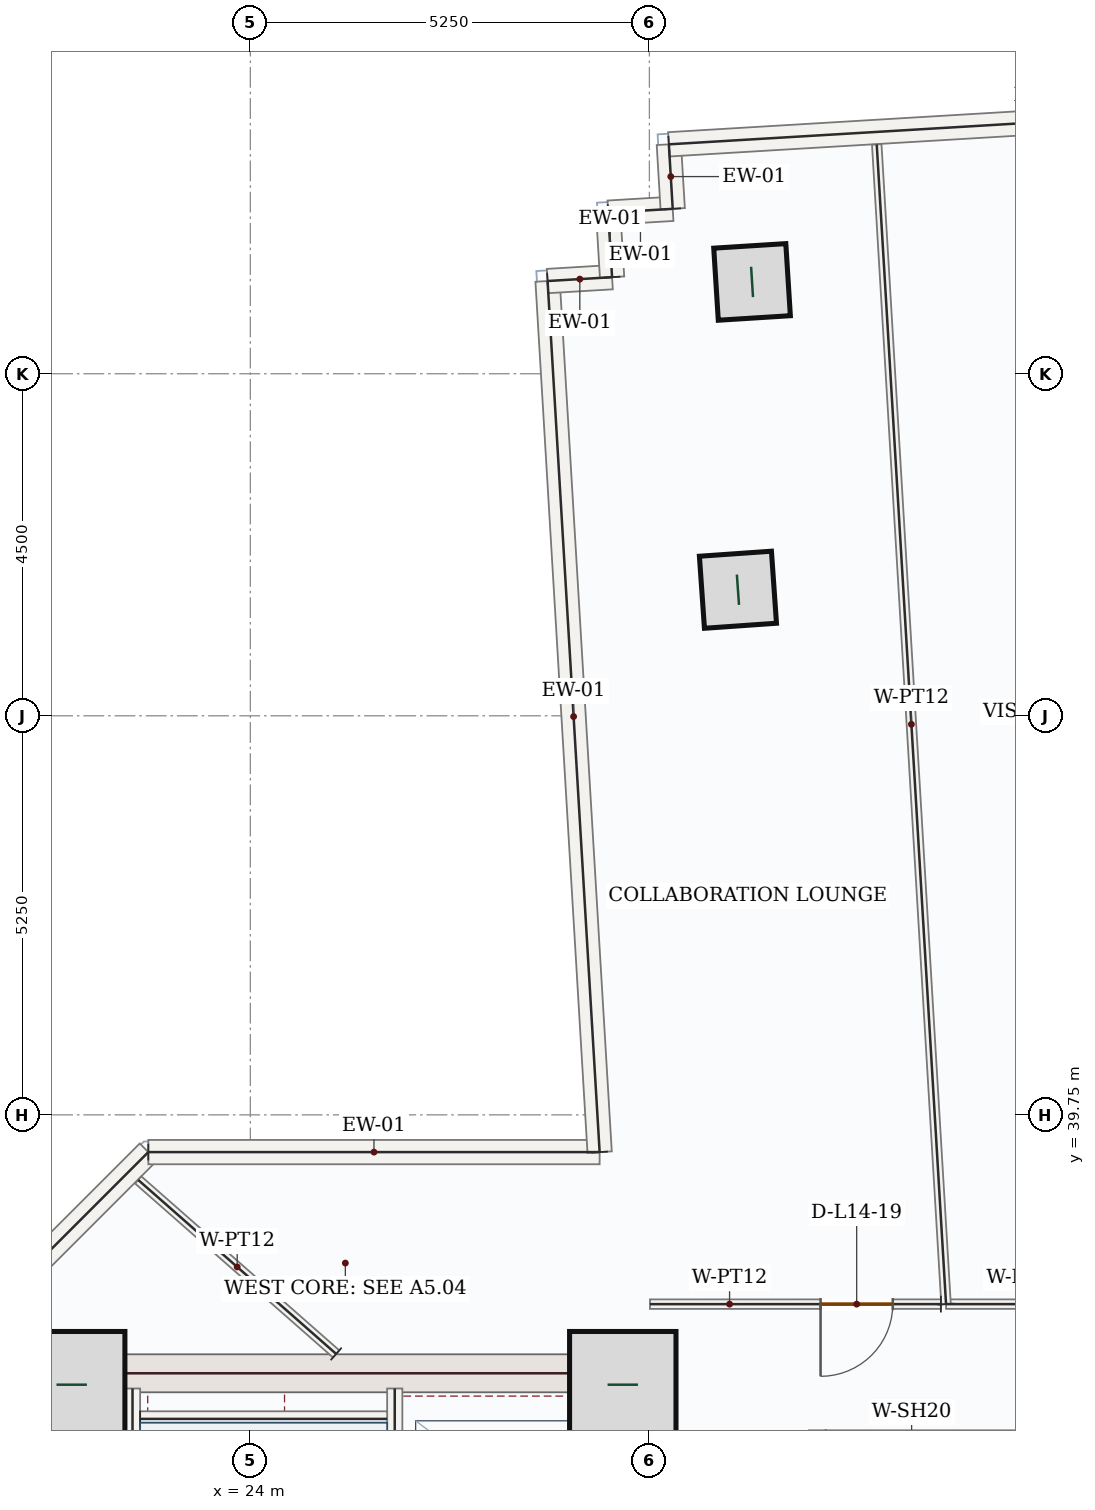
"""IFC4 building model, lengths in metres.
Left out: names, types, materials, properties, quantities, classifications, styles, units other than length and angle.
Written with IfcOpenShell. Run it as: python <this file> out.ifc"""

import sys

from ifc_helpers import new_model, si_unit, direction, frame, frame_2d, origin, origin_2d, place, context, subcontext, project, spatial, rectangle, hollow_rectangle, extrude, source, transform, mapped, element, fill, save


model = new_model("IFC4")
c1 = context("Model", 3, precision=1e-05, world=origin(), true_north=direction((0.0, 1.0)))
c2 = subcontext(c1, "Body", "Model", "MODEL_VIEW")
j1 = project(units=[si_unit("LENGTHUNIT", "METRE"), si_unit("PLANEANGLEUNIT", "RADIAN")], contexts=[c1])
p1 = place(None, origin())
s1 = spatial("IfcSite", under=j1, at=p1, CompositionType="ELEMENT")
p2 = place(p1, origin())
s2 = spatial("IfcBuilding", under=s1, at=p2, CompositionType="ELEMENT")
p3 = place(p2, frame((0.0, 0.0, 66.9)))
s3 = spatial("IfcBuildingStorey", under=s2, at=p3, CompositionType="ELEMENT", Elevation=66.9)
m1 = source(origin(), c2, "Body", "SweptSolid", [
    extrude(rectangle(XDim=8.55, YDim=0.5, at=frame_2d((4.275, 0.0))), origin(), (0.0, 0.0, 1.0), 3.95),
])
p4 = place(p3, frame((21.5, 28.05, 0.0), z_axis=(0.0, 0.0, 1.0), x_axis=(0.0, 1.0, 0.0)))
e1 = element("IfcWall", 1, at=p4, inside=s3, PredefinedType="SHEAR", context=c2, shape_type="MappedRepresentation", body=[
    mapped(m1, transform((0.0, 0.0, 0.0), x_axis=(1.0, 0.0, 0.0), y_axis=(0.0, 1.0, 0.0), z_axis=(0.0, 0.0, 1.0), scale=1.0)),
])
p5 = place(p3, frame((29.0, 28.05, 0.0), z_axis=(0.0, 0.0, 1.0), x_axis=(0.0, 1.0, 0.0)))
e2 = element("IfcWall", 2, at=p5, inside=s3, PredefinedType="SHEAR", context=c2, shape_type="SweptSolid", body=[
    extrude(rectangle(XDim=8.55, YDim=0.5, at=frame_2d((4.275, 0.0))), origin(), (0.0, 0.0, 1.0), 3.95),
])
p6 = place(p5, frame((1.5, 0.0, 0.0)))
e3 = element("IfcOpeningElement", 3, at=p6, cuts=e2, PredefinedType="OPENING", context=c2, shape_type="SweptSolid", body=[
    extrude(rectangle(XDim=1.1, YDim=2.2, at=frame_2d((0.55, 1.1))), frame((0.0, 0.26, 0.0), z_axis=(0.0, -1.0, 0.0), x_axis=(1.0, 0.0, 0.0)), (0.0, 0.0, 1.0), 0.52),
])
m2 = source(origin(), c2, "Body", "SweptSolid", [
    extrude(rectangle(XDim=7.0, YDim=0.5, at=frame_2d((3.5, 0.0))), origin(), (0.0, 0.0, 1.0), 3.95),
])
p7 = place(p3, frame((21.75, 36.35, 0.0), z_axis=(0.0, 0.0, 1.0), x_axis=(1.0, 0.0, 0.0)))
e4 = element("IfcWall", 4, at=p7, inside=s3, PredefinedType="SHEAR", context=c2, shape_type="MappedRepresentation", body=[
    mapped(m2, transform((0.0, 0.0, 0.0), x_axis=(1.0, 0.0, 0.0), y_axis=(0.0, 1.0, 0.0), z_axis=(0.0, 0.0, 1.0), scale=1.0)),
])
m3 = source(origin(), c2, "Body", "SweptSolid", [
    extrude(rectangle(XDim=1.4, YDim=1.4, at=origin_2d()), origin(), (0.0, 0.0, 1.0), 4.2),
])
for number, where, z_axis, x_axis in (
    (5, (21.65, 36.2, 0.0), (0.0, 0.0, 1.0), (1.0, 0.0, 0.0)),
    (6, (28.9, 36.2, 0.0), (0.0, 0.0, 1.0), (1.0, 0.0, 0.0)),
):
    element("IfcColumn", number, at=place(p3, frame(where, z_axis=z_axis, x_axis=x_axis)), inside=s3, PredefinedType="COLUMN", context=c2, shape_type="MappedRepresentation", body=[
        mapped(m3, transform((0.0, 0.0, 0.0), x_axis=(1.0, 0.0, 0.0), y_axis=(0.0, 1.0, 0.0), z_axis=(0.0, 0.0, 1.0), scale=1.0)),
    ])
m4 = source(origin(), c2, "Body", "SweptSolid", [
    extrude(hollow_rectangle(XDim=0.95, YDim=0.95, WallThickness=0.05, at=origin_2d()), origin(), (0.0, 0.0, 1.0), 4.2),
])
for number, where, z_axis, x_axis in (
    (7, (30.415, 46.658, 0.0), (0.0, 0.0, 1.0), (-0.07, 0.998, 0.0)),
    (8, (30.601, 50.708, 0.0), (0.0, 0.0, 1.0), (-0.063, 0.998, 0.0)),
):
    element("IfcColumn", number, at=place(p3, frame(where, z_axis=z_axis, x_axis=x_axis)), inside=s3, PredefinedType="COLUMN", context=c2, shape_type="MappedRepresentation", body=[
        mapped(m4, transform((0.0, 0.0, 0.0), x_axis=(1.0, 0.0, 0.0), y_axis=(0.0, 1.0, 0.0), z_axis=(0.0, 0.0, 1.0), scale=1.0)),
    ])
m5 = source(origin(), c2, "Body", "SweptSolid", [
    extrude(rectangle(XDim=5.258, YDim=0.32, at=frame_2d((2.629, 0.0))), origin(), (0.0, 0.0, 1.0), 3.95),
])
p8 = place(p3, frame((18.94, 35.542, 0.0), z_axis=(0.0, 0.0, 1.0), x_axis=(0.707106781187, 0.707106781187, 0.0)))
e9 = element("IfcWall", 9, at=p8, inside=s3, PredefinedType="SOLIDWALL", context=c2, shape_type="MappedRepresentation", body=[
    mapped(m5, transform((0.0, 0.0, 0.0), x_axis=(1.0, 0.0, 0.0), y_axis=(0.0, 1.0, 0.0), z_axis=(0.0, 0.0, 1.0), scale=1.0)),
])
m6 = source(origin(), c2, "Body", "SweptSolid", [
    extrude(rectangle(XDim=5.938, YDim=0.32, at=frame_2d((2.969, 0.0))), origin(), (0.0, 0.0, 1.0), 3.95),
])
p9 = place(p3, frame((22.658, 39.26, 0.0), z_axis=(0.0, 0.0, 1.0), x_axis=(1.0, 0.0, 0.0)))
e10 = element("IfcWall", 10, at=p9, inside=s3, PredefinedType="SOLIDWALL", context=c2, shape_type="MappedRepresentation", body=[
    mapped(m6, transform((0.0, 0.0, 0.0), x_axis=(1.0, 0.0, 0.0), y_axis=(0.0, 1.0, 0.0), z_axis=(0.0, 0.0, 1.0), scale=1.0)),
])
m7 = source(origin(), c2, "Body", "SweptSolid", [
    extrude(rectangle(XDim=11.48, YDim=0.32, at=frame_2d((5.74, 0.0))), origin(), (0.0, 0.0, 1.0), 3.95),
])
p10 = place(p3, frame((28.595, 39.26, 0.0), z_axis=(0.0, 0.0, 1.0), x_axis=(-0.059651994121, 0.998219234235, 0.0)))
e11 = element("IfcWall", 11, at=p10, inside=s3, PredefinedType="SOLIDWALL", context=c2, shape_type="MappedRepresentation", body=[
    mapped(m7, transform((0.0, 0.0, 0.0), x_axis=(1.0, 0.0, 0.0), y_axis=(0.0, 1.0, 0.0), z_axis=(0.0, 0.0, 1.0), scale=1.0)),
])
m8 = source(origin(), c2, "Body", "SweptSolid", [
    extrude(rectangle(XDim=0.85, YDim=0.32, at=frame_2d((0.425, 0.0))), origin(), (0.0, 0.0, 1.0), 3.95),
])
for number, where, z_axis, x_axis in (
    (12, (27.911, 50.72, 0.0), (0.0, 0.0, 1.0), (0.998, 0.06, 0.0)),
    (13, (28.759, 50.771, 0.0), (0.0, 0.0, 1.0), (-0.059, 0.998, 0.0)),
    (14, (28.708, 51.619, 0.0), (0.0, 0.0, 1.0), (0.998, 0.06, 0.0)),
    (15, (29.557, 51.67, 0.0), (0.0, 0.0, 1.0), (-0.06, 0.998, 0.0)),
):
    element("IfcWall", number, at=place(p3, frame(where, z_axis=z_axis, x_axis=x_axis)), inside=s3, PredefinedType="SOLIDWALL", context=c2, shape_type="MappedRepresentation", body=[
        mapped(m8, transform((0.0, 0.0, 0.0), x_axis=(1.0, 0.0, 0.0), y_axis=(0.0, 1.0, 0.0), z_axis=(0.0, 0.0, 1.0), scale=1.0)),
    ])
m9 = source(origin(), c2, "Body", "SweptSolid", [
    extrude(rectangle(XDim=9.92, YDim=0.32, at=frame_2d((4.96, 0.0))), origin(), (0.0, 0.0, 1.0), 3.95),
])
p11 = place(p3, frame((29.506, 52.518, 0.0), z_axis=(0.0, 0.0, 1.0), x_axis=(0.998218942745, 0.059656871726, 0.0)))
e16 = element("IfcWall", 16, at=p11, inside=s3, PredefinedType="SOLIDWALL", context=c2, shape_type="MappedRepresentation", body=[
    mapped(m9, transform((0.0, 0.0, 0.0), x_axis=(1.0, 0.0, 0.0), y_axis=(0.0, 1.0, 0.0), z_axis=(0.0, 0.0, 1.0), scale=1.0)),
])
m10 = source(origin(), c2, "Body", "SweptSolid", [
    extrude(rectangle(XDim=7.87, YDim=0.2, at=frame_2d((3.935, 0.0))), origin(), (0.0, 0.0, 1.0), 3.95),
])
p12 = place(p3, frame((22.45, 28.28, 0.0), z_axis=(0.0, 0.0, 1.0), x_axis=(0.0, 1.0, 0.0)))
e17 = element("IfcWall", 17, at=p12, inside=s3, PredefinedType="SOLIDWALL", context=c2, shape_type="MappedRepresentation", body=[
    mapped(m10, transform((0.0, 0.0, 0.0), x_axis=(1.0, 0.0, 0.0), y_axis=(0.0, 1.0, 0.0), z_axis=(0.0, 0.0, 1.0), scale=1.0)),
])
p13 = place(p3, frame((25.9, 28.15, 0.0), z_axis=(0.0, 0.0, 1.0), x_axis=(0.0, 1.0, 0.0)))
e18 = element("IfcWall", 18, at=p13, inside=s3, PredefinedType="SOLIDWALL", context=c2, shape_type="SweptSolid", body=[
    extrude(rectangle(XDim=8.0, YDim=0.2, at=frame_2d((4.0, 0.0))), origin(), (0.0, 0.0, 1.0), 3.95),
])
p14 = place(p13, frame((0.4, 0.0, 0.0)))
e19 = element("IfcOpeningElement", 19, at=p14, cuts=e18, PredefinedType="OPENING", context=c2, shape_type="SweptSolid", body=[
    extrude(rectangle(XDim=1.05, YDim=2.15, at=frame_2d((0.525, 1.075))), frame((0.0, 0.11, 0.0), z_axis=(0.0, -1.0, 0.0), x_axis=(1.0, 0.0, 0.0)), (0.0, 0.0, 1.0), 0.22),
])
m11 = source(origin(), c2, "Body", "SweptSolid", [
    extrude(rectangle(XDim=3.25, YDim=0.2, at=frame_2d((1.625, 0.0))), origin(), (0.0, 0.0, 1.0), 3.95),
])
p15 = place(p3, frame((22.55, 35.75, 0.0), z_axis=(0.0, 0.0, 1.0), x_axis=(1.0, 0.0, 0.0)))
e20 = element("IfcWall", 20, at=p15, inside=s3, PredefinedType="SOLIDWALL", context=c2, shape_type="MappedRepresentation", body=[
    mapped(m11, transform((0.0, 0.0, 0.0), x_axis=(1.0, 0.0, 0.0), y_axis=(0.0, 1.0, 0.0), z_axis=(0.0, 0.0, 1.0), scale=1.0)),
])
m12 = source(origin(), c2, "Body", "SweptSolid", [
    extrude(rectangle(XDim=2.4, YDim=0.2, at=frame_2d((1.2, 0.0))), origin(), (0.0, 0.0, 1.0), 3.95),
])
for number, where, z_axis, x_axis in (
    (21, (31.45, 33.2, 0.0), (0.0, 0.0, 1.0), (0.0, 1.0, 0.0)),
    (22, (33.95, 33.2, 0.0), (0.0, 0.0, 1.0), (0.0, 1.0, 0.0)),
):
    element("IfcWall", number, at=place(p3, frame(where, z_axis=z_axis, x_axis=x_axis)), inside=s3, PredefinedType="SOLIDWALL", context=c2, shape_type="MappedRepresentation", body=[
        mapped(m12, transform((0.0, 0.0, 0.0), x_axis=(1.0, 0.0, 0.0), y_axis=(0.0, 1.0, 0.0), z_axis=(0.0, 0.0, 1.0), scale=1.0)),
    ])
p16 = place(p3, frame((36.932, 37.26, 0.0), z_axis=(0.0, 0.0, 1.0), x_axis=(-1.0, 0.0, 0.0)))
e23 = element("IfcWall", 23, at=p16, inside=s3, PredefinedType="PARTITIONING", context=c2, shape_type="SweptSolid", body=[
    extrude(rectangle(XDim=3.779, YDim=0.125, at=frame_2d((1.89, 0.0))), origin(), (0.0, 0.0, 1.0), 3.95),
])
p17 = place(p16, frame((0.622, 0.0, 0.0)))
e24 = element("IfcOpeningElement", 24, at=p17, cuts=e23, PredefinedType="OPENING", context=c2, shape_type="SweptSolid", body=[
    extrude(rectangle(XDim=0.95, YDim=2.15, at=frame_2d((0.475, 1.075))), frame((0.0, 0.073, 0.0), z_axis=(0.0, -1.0, 0.0), x_axis=(1.0, 0.0, 0.0)), (0.0, 0.0, 1.0), 0.145),
])
m13 = source(origin(), c2, "Body", "SweptSolid", [
    extrude(rectangle(XDim=15.283, YDim=0.125, at=frame_2d((7.642, 0.0))), origin(), (0.0, 0.0, 1.0), 3.95),
])
p18 = place(p3, frame((33.153, 37.26, 0.0), z_axis=(0.0, 0.0, 1.0), x_axis=(-0.059648121824, 0.99821946563, 0.0)))
e25 = element("IfcWall", 25, at=p18, inside=s3, PredefinedType="PARTITIONING", context=c2, shape_type="MappedRepresentation", body=[
    mapped(m13, transform((0.0, 0.0, 0.0), x_axis=(1.0, 0.0, 0.0), y_axis=(0.0, 1.0, 0.0), z_axis=(0.0, 0.0, 1.0), scale=1.0)),
])
p19 = place(p3, frame((33.085, 37.26, 0.0), z_axis=(0.0, 0.0, 1.0), x_axis=(-0.999999997966, -6.3783646e-05, 0.0)))
e26 = element("IfcWall", 26, at=p19, inside=s3, PredefinedType="PARTITIONING", context=c2, shape_type="SweptSolid", body=[
    extrude(rectangle(XDim=3.828, YDim=0.125, at=frame_2d((1.914, 0.0))), origin(), (0.0, 0.0, 1.0), 3.95),
])
p20 = place(p19, frame((0.633, 0.0, 0.0)))
e27 = element("IfcOpeningElement", 27, at=p20, cuts=e26, PredefinedType="OPENING", context=c2, shape_type="SweptSolid", body=[
    extrude(rectangle(XDim=0.95, YDim=2.15, at=frame_2d((0.475, 1.075))), frame((0.0, 0.073, 0.0), z_axis=(0.0, -1.0, 0.0), x_axis=(1.0, 0.0, 0.0)), (0.0, 0.0, 1.0), 0.145),
])
m14 = source(origin(), c2, "Body", "SweptSolid", [
    extrude(rectangle(XDim=3.467, YDim=0.125, at=frame_2d((1.733, 0.0))), origin(), (0.0, 0.0, 1.0), 3.95),
])
p21 = place(p3, frame((25.129, 36.605, 0.0), z_axis=(0.0, 0.0, 1.0), x_axis=(-0.751135268809, 0.66014832269, 0.0)))
e28 = element("IfcWall", 28, at=p21, inside=s3, PredefinedType="PARTITIONING", context=c2, shape_type="MappedRepresentation", body=[
    mapped(m14, transform((0.0, 0.0, 0.0), x_axis=(1.0, 0.0, 0.0), y_axis=(0.0, 1.0, 0.0), z_axis=(0.0, 0.0, 1.0), scale=1.0)),
])
m15 = source(origin(), c2, "Body", "SweptSolid", [
    extrude(rectangle(XDim=0.95, YDim=2.15, at=frame_2d((0.475, 1.075))), frame((0.0, 0.025, 0.0), z_axis=(0.0, -1.0, 0.0), x_axis=(1.0, 0.0, 0.0)), (0.0, 0.0, 1.0), 0.05),
])
p22 = place(p20, origin())
e29 = element("IfcDoor", 29, at=p22, inside=s3, OperationType="SINGLE_SWING_RIGHT", PredefinedType="DOOR", context=c2, shape_type="MappedRepresentation", body=[
    mapped(m15, transform((0.0, 0.0, 0.0), x_axis=(1.0, 0.0, 0.0), y_axis=(0.0, 1.0, 0.0), z_axis=(0.0, 0.0, 1.0), scale=1.0)),
])
fill(e27, e29)
save(model, sys.argv[1])
